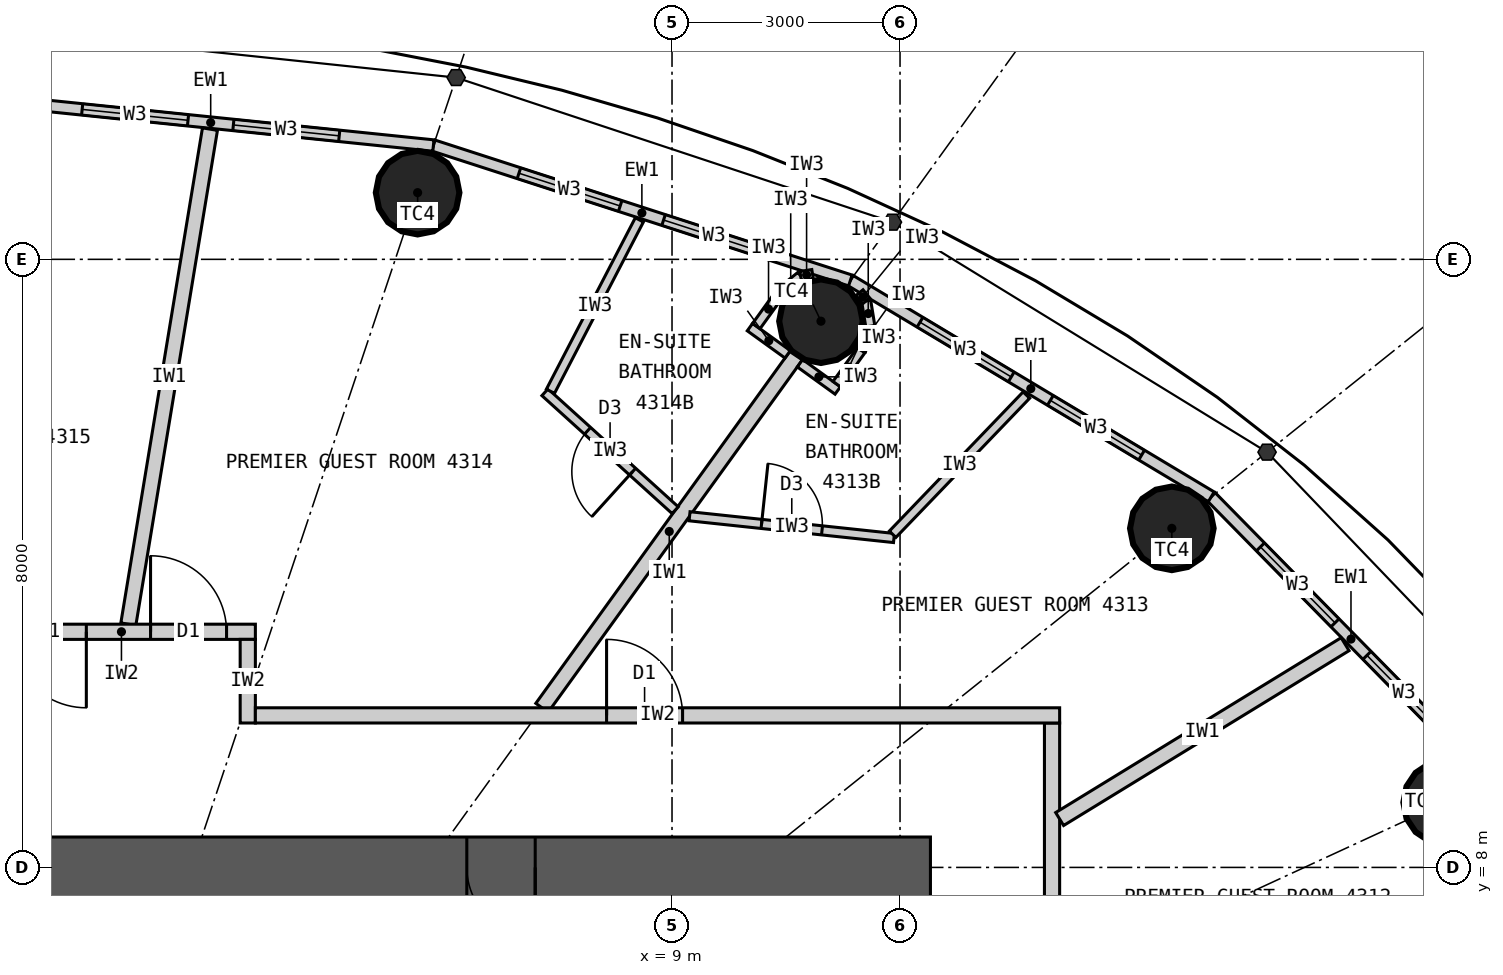
"""IFC4 building model, lengths in metres.
Left out: names, types, materials, properties, quantities, classifications, styles, units other than length and angle.
Written with IfcOpenShell. Run it as: python <this file> out.ifc"""

import sys

from ifc_helpers import new_model, si_unit, direction, frame, frame_2d, origin, origin_2d, place, context, subcontext, project, spatial, rectangle, circle, extrude, element, fill, save


model = new_model("IFC4")
c1 = context("Model", 3, precision=1e-05, world=origin(), true_north=direction((0.0, 1.0)))
c2 = subcontext(c1, "Body", "Model", "MODEL_VIEW")
j1 = project(units=[si_unit("LENGTHUNIT", "METRE"), si_unit("PLANEANGLEUNIT", "RADIAN")], contexts=[c1])
p1 = place(None, origin())
s1 = spatial("IfcSite", under=j1, at=p1, CompositionType="ELEMENT")
p2 = place(p1, origin())
s2 = spatial("IfcBuilding", under=s1, at=p2, CompositionType="ELEMENT")
p3 = place(p2, frame((0.0, 0.0, 163.2)))
s3 = spatial("IfcBuildingStorey", under=s2, at=p3, CompositionType="ELEMENT", Elevation=163.2)
for number, where, z_axis, x_axis in (
    (1, (19.172, 8.855, 0.0), (0.0, 0.0, 1.0), (1.0, 0.0, 0.0)),
    (2, (15.576, 12.461, 0.0), (0.0, 0.0, 1.0), (1.0, 0.0, 0.0)),
    (3, (10.96, 15.186, 0.0), (0.0, 0.0, 1.0), (1.0, 0.0, 0.0)),
    (4, (5.653, 16.877, 0.0), (0.0, 0.0, 1.0), (1.0, 0.0, 0.0)),
):
    element("IfcColumn", number, at=place(p3, frame(where, z_axis=z_axis, x_axis=x_axis)), inside=s3, PredefinedType="COLUMN", context=c2, shape_type="SweptSolid", body=[
        extrude(circle(Radius=0.55, at=origin_2d()), origin(), (0.0, 0.0, 1.0), 3.3),
    ])
p4 = place(p3, frame((-12.4, 8.0, 0.0), z_axis=(0.0, 0.0, 1.0), x_axis=(1.0, 0.0, 0.0)))
e5 = element("IfcWall", 5, at=p4, inside=s3, PredefinedType="SHEAR", context=c2, shape_type="SweptSolid", body=[
    extrude(rectangle(XDim=24.8, YDim=0.8, at=frame_2d((12.4, 0.0))), origin(), (0.0, 0.0, 1.0), 3.3),
])
p5 = place(p4, frame((11.1, 0.0, 0.0)))
e6 = element("IfcOpeningElement", 6, at=p5, cuts=e5, PredefinedType="OPENING", context=c2, shape_type="SweptSolid", body=[
    extrude(rectangle(XDim=1.2, YDim=2.2, at=frame_2d((0.6, 1.1))), frame((0.0, 0.41, 0.0), z_axis=(0.0, -1.0, 0.0), x_axis=(1.0, 0.0, 0.0)), (0.0, 0.0, 1.0), 0.82),
])
p6 = place(p4, frame((18.7, 0.0, 0.0)))
e7 = element("IfcOpeningElement", 7, at=p6, cuts=e5, PredefinedType="OPENING", context=c2, shape_type="SweptSolid", body=[
    extrude(rectangle(XDim=0.9, YDim=2.2, at=frame_2d((0.45, 1.1))), frame((0.0, 0.41, 0.0), z_axis=(0.0, -1.0, 0.0), x_axis=(1.0, 0.0, 0.0)), (0.0, 0.0, 1.0), 0.82),
])
p7 = place(p3, frame((19.772, 9.132, 0.0), z_axis=(0.0, 0.0, 1.0), x_axis=(-0.700727467776, 0.71342905457, 0.0)))
e8 = element("IfcWall", 8, at=p7, inside=s3, PredefinedType="ELEMENTEDWALL", context=c2, shape_type="SweptSolid", body=[
    extrude(rectangle(XDim=5.247, YDim=0.15, at=frame_2d((2.624, 0.0))), origin(), (0.0, 0.0, 1.0), 3.12),
])
p8 = place(p7, frame((0.924, 0.0, 0.9)))
e9 = element("IfcOpeningElement", 9, at=p8, cuts=e8, PredefinedType="OPENING", context=c2, shape_type="SweptSolid", body=[
    extrude(rectangle(XDim=1.4, YDim=1.9, at=frame_2d((0.7, 0.95))), frame((0.0, 0.085, 0.0), z_axis=(0.0, -1.0, 0.0), x_axis=(1.0, 0.0, 0.0)), (0.0, 0.0, 1.0), 0.17),
])
p9 = place(p7, frame((2.924, 0.0, 0.9)))
e10 = element("IfcOpeningElement", 10, at=p9, cuts=e8, PredefinedType="OPENING", context=c2, shape_type="SweptSolid", body=[
    extrude(rectangle(XDim=1.4, YDim=1.9, at=frame_2d((0.7, 0.95))), frame((0.0, 0.085, 0.0), z_axis=(0.0, -1.0, 0.0), x_axis=(1.0, 0.0, 0.0)), (0.0, 0.0, 1.0), 0.17),
])
p10 = place(p3, frame((16.095, 12.876, 0.0), z_axis=(0.0, 0.0, 1.0), x_axis=(-0.857695199231, 0.514158482587, 0.0)))
e11 = element("IfcWall", 11, at=p10, inside=s3, PredefinedType="ELEMENTEDWALL", context=c2, shape_type="SweptSolid", body=[
    extrude(rectangle(XDim=5.536, YDim=0.15, at=frame_2d((2.768, 0.0))), origin(), (0.0, 0.0, 1.0), 3.12),
])
p11 = place(p10, frame((1.068, 0.0, 0.9)))
e12 = element("IfcOpeningElement", 12, at=p11, cuts=e11, PredefinedType="OPENING", context=c2, shape_type="SweptSolid", body=[
    extrude(rectangle(XDim=1.4, YDim=1.9, at=frame_2d((0.7, 0.95))), frame((0.0, 0.085, 0.0), z_axis=(0.0, -1.0, 0.0), x_axis=(1.0, 0.0, 0.0)), (0.0, 0.0, 1.0), 0.17),
])
p12 = place(p10, frame((3.068, 0.0, 0.9)))
e13 = element("IfcOpeningElement", 13, at=p12, cuts=e11, PredefinedType="OPENING", context=c2, shape_type="SweptSolid", body=[
    extrude(rectangle(XDim=1.4, YDim=1.9, at=frame_2d((0.7, 0.95))), frame((0.0, 0.085, 0.0), z_axis=(0.0, -1.0, 0.0), x_axis=(1.0, 0.0, 0.0)), (0.0, 0.0, 1.0), 0.17),
])
p13 = place(p3, frame((11.346, 15.722, 0.0), z_axis=(0.0, 0.0, 1.0), x_axis=(-0.951432482129, 0.307857486429, 0.0)))
e14 = element("IfcWall", 14, at=p13, inside=s3, PredefinedType="ELEMENTEDWALL", context=c2, shape_type="SweptSolid", body=[
    extrude(rectangle(XDim=5.766, YDim=0.15, at=frame_2d((2.883, 0.0))), origin(), (0.0, 0.0, 1.0), 3.12),
])
p14 = place(p13, frame((1.183, 0.0, 0.9)))
e15 = element("IfcOpeningElement", 15, at=p14, cuts=e14, PredefinedType="OPENING", context=c2, shape_type="SweptSolid", body=[
    extrude(rectangle(XDim=1.4, YDim=1.9, at=frame_2d((0.7, 0.95))), frame((0.0, 0.085, 0.0), z_axis=(0.0, -1.0, 0.0), x_axis=(1.0, 0.0, 0.0)), (0.0, 0.0, 1.0), 0.17),
])
p15 = place(p13, frame((3.183, 0.0, 0.9)))
e16 = element("IfcOpeningElement", 16, at=p15, cuts=e14, PredefinedType="OPENING", context=c2, shape_type="SweptSolid", body=[
    extrude(rectangle(XDim=1.4, YDim=1.9, at=frame_2d((0.7, 0.95))), frame((0.0, 0.085, 0.0), z_axis=(0.0, -1.0, 0.0), x_axis=(1.0, 0.0, 0.0)), (0.0, 0.0, 1.0), 0.17),
])
p16 = place(p3, frame((5.86, 17.497, 0.0), z_axis=(0.0, 0.0, 1.0), x_axis=(-0.994751738032, 0.102318032045, 0.0)))
e17 = element("IfcWall", 17, at=p16, inside=s3, PredefinedType="ELEMENTEDWALL", context=c2, shape_type="SweptSolid", body=[
    extrude(rectangle(XDim=5.891, YDim=0.15, at=frame_2d((2.946, 0.0))), origin(), (0.0, 0.0, 1.0), 3.12),
])
p17 = place(p16, frame((1.246, 0.0, 0.9)))
e18 = element("IfcOpeningElement", 18, at=p17, cuts=e17, PredefinedType="OPENING", context=c2, shape_type="SweptSolid", body=[
    extrude(rectangle(XDim=1.4, YDim=1.9, at=frame_2d((0.7, 0.95))), frame((0.0, 0.085, 0.0), z_axis=(0.0, -1.0, 0.0), x_axis=(1.0, 0.0, 0.0)), (0.0, 0.0, 1.0), 0.17),
])
p18 = place(p16, frame((3.246, 0.0, 0.9)))
e19 = element("IfcOpeningElement", 19, at=p18, cuts=e17, PredefinedType="OPENING", context=c2, shape_type="SweptSolid", body=[
    extrude(rectangle(XDim=1.4, YDim=1.9, at=frame_2d((0.7, 0.95))), frame((0.0, 0.085, 0.0), z_axis=(0.0, -1.0, 0.0), x_axis=(1.0, 0.0, 0.0)), (0.0, 0.0, 1.0), 0.17),
])
p19 = place(p3, frame((14.0, -9.9, 0.0), z_axis=(0.0, 0.0, 1.0), x_axis=(0.0, 1.0, 0.0)))
e20 = element("IfcWall", 20, at=p19, inside=s3, PredefinedType="PARTITIONING", context=c2, shape_type="SweptSolid", body=[
    extrude(rectangle(XDim=19.8, YDim=0.2, at=frame_2d((9.9, 0.0))), origin(), (0.0, 0.0, 1.0), 3.12),
])
p20 = place(p19, frame((3.824, 0.0, 0.0)))
e21 = element("IfcOpeningElement", 21, at=p20, cuts=e20, PredefinedType="OPENING", context=c2, shape_type="SweptSolid", body=[
    extrude(rectangle(XDim=1.0, YDim=2.2, at=frame_2d((0.5, 1.1))), frame((0.0, 0.11, 0.0), z_axis=(0.0, -1.0, 0.0), x_axis=(1.0, 0.0, 0.0)), (0.0, 0.0, 1.0), 0.22),
])
p21 = place(p19, frame((8.719, 0.0, 0.0)))
e22 = element("IfcOpeningElement", 22, at=p21, cuts=e20, PredefinedType="OPENING", context=c2, shape_type="SweptSolid", body=[
    extrude(rectangle(XDim=1.0, YDim=2.2, at=frame_2d((0.5, 1.1))), frame((0.0, 0.11, 0.0), z_axis=(0.0, -1.0, 0.0), x_axis=(1.0, 0.0, 0.0)), (0.0, 0.0, 1.0), 0.22),
])
p22 = place(p19, frame((15.482, 0.0, 0.0)))
e23 = element("IfcOpeningElement", 23, at=p22, cuts=e20, PredefinedType="OPENING", context=c2, shape_type="SweptSolid", body=[
    extrude(rectangle(XDim=1.0, YDim=2.2, at=frame_2d((0.5, 1.1))), frame((0.0, 0.11, 0.0), z_axis=(0.0, -1.0, 0.0), x_axis=(1.0, 0.0, 0.0)), (0.0, 0.0, 1.0), 0.22),
])
p23 = place(p3, frame((14.1, 8.636, 0.0), z_axis=(0.0, 0.0, 1.0), x_axis=(0.852731884196, 0.522348862041, 0.0)))
e24 = element("IfcWall", 24, at=p23, inside=s3, PredefinedType="PARTITIONING", context=c2, shape_type="SweptSolid", body=[
    extrude(rectangle(XDim=4.404, YDim=0.2, at=frame_2d((2.202, 0.0))), origin(), (0.0, 0.0, 1.0), 3.12),
])
p24 = place(p3, frame((7.289, 10.1, 0.0), z_axis=(0.0, 0.0, 1.0), x_axis=(0.585222595178, 0.810872686735, 0.0)))
e25 = element("IfcWall", 25, at=p24, inside=s3, PredefinedType="PARTITIONING", context=c2, shape_type="SweptSolid", body=[
    extrude(rectangle(XDim=5.722, YDim=0.2, at=frame_2d((2.861, 0.0))), origin(), (0.0, 0.0, 1.0), 2.42),
])
p25 = place(p3, frame((1.847, 11.2, 0.0), z_axis=(0.0, 0.0, 1.0), x_axis=(0.162695449404, 0.986676335352, 0.0)))
e26 = element("IfcWall", 26, at=p25, inside=s3, PredefinedType="PARTITIONING", context=c2, shape_type="SweptSolid", body=[
    extrude(rectangle(XDim=6.601, YDim=0.2, at=frame_2d((3.301, 0.0))), origin(), (0.0, 0.0, 1.0), 3.12),
])
p26 = place(p3, frame((-0.006, 11.1, 0.0), z_axis=(0.0, 0.0, 1.0), x_axis=(1.0, 0.0, 0.0)))
e27 = element("IfcWall", 27, at=p26, inside=s3, PredefinedType="PARTITIONING", context=c2, shape_type="SweptSolid", body=[
    extrude(rectangle(XDim=3.524, YDim=0.2, at=frame_2d((1.762, 0.0))), origin(), (0.0, 0.0, 1.0), 3.12),
])
p27 = place(p26, frame((2.145, 0.0, 0.0)))
e28 = element("IfcOpeningElement", 28, at=p27, cuts=e27, PredefinedType="OPENING", context=c2, shape_type="SweptSolid", body=[
    extrude(rectangle(XDim=1.0, YDim=2.2, at=frame_2d((0.5, 1.1))), frame((0.0, 0.11, 0.0), z_axis=(0.0, -1.0, 0.0), x_axis=(1.0, 0.0, 0.0)), (0.0, 0.0, 1.0), 0.22),
])
p28 = place(p26, frame((0.3, 0.0, 0.0)))
e29 = element("IfcOpeningElement", 29, at=p28, cuts=e27, PredefinedType="OPENING", context=c2, shape_type="SweptSolid", body=[
    extrude(rectangle(XDim=1.0, YDim=2.2, at=frame_2d((0.5, 1.1))), frame((0.0, 0.11, 0.0), z_axis=(0.0, -1.0, 0.0), x_axis=(1.0, 0.0, 0.0)), (0.0, 0.0, 1.0), 0.22),
])
p29 = place(p3, frame((3.418, 9.9, 0.0), z_axis=(0.0, 0.0, 1.0), x_axis=(0.0, 1.0, 0.0)))
e30 = element("IfcWall", 30, at=p29, inside=s3, PredefinedType="PARTITIONING", context=c2, shape_type="SweptSolid", body=[
    extrude(rectangle(XDim=1.1, YDim=0.2, at=frame_2d((0.55, 0.0))), origin(), (0.0, 0.0, 1.0), 3.12),
])
p30 = place(p3, frame((9.231, 12.62, 0.0), z_axis=(0.0, 0.0, 1.0), x_axis=(0.99437860496, -0.10588290701, 0.0)))
e31 = element("IfcWall", 31, at=p30, inside=s3, PredefinedType="PARTITIONING", context=c2, shape_type="SweptSolid", body=[
    extrude(rectangle(XDim=2.705, YDim=0.12, at=frame_2d((1.352, 0.0))), origin(), (0.0, 0.0, 1.0), 3.12),
])
p31 = place(p30, frame((0.952, 0.0, 0.0)))
e32 = element("IfcOpeningElement", 32, at=p31, cuts=e31, PredefinedType="OPENING", context=c2, shape_type="SweptSolid", body=[
    extrude(rectangle(XDim=0.8, YDim=2.1, at=frame_2d((0.4, 1.05))), frame((0.0, 0.07, 0.0), z_axis=(0.0, -1.0, 0.0), x_axis=(1.0, 0.0, 0.0)), (0.0, 0.0, 1.0), 0.14),
])
p32 = place(p3, frame((11.902, 12.383, 0.0), z_axis=(0.0, 0.0, 1.0), x_axis=(0.69298385335, 0.720953104574, 0.0)))
e33 = element("IfcWall", 33, at=p32, inside=s3, PredefinedType="PARTITIONING", context=c2, shape_type="SweptSolid", body=[
    extrude(rectangle(XDim=2.54, YDim=0.12, at=frame_2d((1.27, 0.0))), origin(), (0.0, 0.0, 1.0), 3.12),
])
p33 = place(p3, frame((10.684, 14.633, 0.0), z_axis=(0.0, 0.0, 1.0), x_axis=(0.810921075692, -0.585155542568, 0.0)))
e34 = element("IfcWall", 34, at=p33, inside=s3, PredefinedType="PARTITIONING", context=c2, shape_type="SweptSolid", body=[
    extrude(rectangle(XDim=0.612, YDim=0.12, at=frame_2d((0.306, 0.0))), origin(), (0.0, 0.0, 1.0), 3.12),
])
p34 = place(p3, frame((11.167, 14.359, 0.0), z_axis=(0.0, 0.0, 1.0), x_axis=(0.585263549799, 0.810843127415, 0.0)))
e35 = element("IfcWall", 35, at=p34, inside=s3, PredefinedType="PARTITIONING", context=c2, shape_type="SweptSolid", body=[
    extrude(rectangle(XDim=0.55, YDim=0.12, at=frame_2d((0.275, 0.0))), origin(), (0.0, 0.0, 1.0), 3.12),
])
for number, where, z_axis, x_axis in (
    (36, (11.489, 14.804, 0.0), (0.0, 0.0, 1.0), (0.356, 0.935, 0.0)),
    (37, (11.609, 15.12, 0.0), (0.0, 0.0, 1.0), (-0.16, 0.987, 0.0)),
):
    element("IfcWall", number, at=place(p3, frame(where, z_axis=z_axis, x_axis=x_axis)), inside=s3, PredefinedType="PARTITIONING", context=c2, shape_type="SweptSolid", body=[
        extrude(rectangle(XDim=0.338, YDim=0.12, at=frame_2d((0.169, 0.0))), origin(), (0.0, 0.0, 1.0), 3.12),
    ])
p35 = place(p3, frame((11.555, 15.453, 0.0), z_axis=(0.0, 0.0, 1.0), x_axis=(-0.631711901025, 0.775203246964, 0.0)))
e38 = element("IfcWall", 38, at=p35, inside=s3, PredefinedType="PARTITIONING", context=c2, shape_type="SweptSolid", body=[
    extrude(rectangle(XDim=0.139, YDim=0.12, at=frame_2d((0.07, 0.0))), origin(), (0.0, 0.0, 1.0), 3.12),
])
p36 = place(p3, frame((9.042, 12.699, 0.0), z_axis=(0.0, 0.0, 1.0), x_axis=(-0.741100257539, 0.671394376112, 0.0)))
e39 = element("IfcWall", 39, at=p36, inside=s3, PredefinedType="PARTITIONING", context=c2, shape_type="SweptSolid", body=[
    extrude(rectangle(XDim=2.312, YDim=0.12, at=frame_2d((1.156, 0.0))), origin(), (0.0, 0.0, 1.0), 3.12),
])
p37 = place(p36, frame((0.756, 0.0, 0.0)))
e40 = element("IfcOpeningElement", 40, at=p37, cuts=e39, PredefinedType="OPENING", context=c2, shape_type="SweptSolid", body=[
    extrude(rectangle(XDim=0.8, YDim=2.1, at=frame_2d((0.4, 1.05))), frame((0.0, 0.07, 0.0), z_axis=(0.0, -1.0, 0.0), x_axis=(1.0, 0.0, 0.0)), (0.0, 0.0, 1.0), 0.14),
])
p38 = place(p3, frame((7.401, 14.264, 0.0), z_axis=(0.0, 0.0, 1.0), x_axis=(0.460505131319, 0.887657041897, 0.0)))
e41 = element("IfcWall", 41, at=p38, inside=s3, PredefinedType="PARTITIONING", context=c2, shape_type="SweptSolid", body=[
    extrude(rectangle(XDim=2.54, YDim=0.12, at=frame_2d((1.27, 0.0))), origin(), (0.0, 0.0, 1.0), 3.12),
])
p39 = place(p3, frame((10.522, 14.75, 0.0), z_axis=(0.0, 0.0, 1.0), x_axis=(-0.811057588427, 0.584966313777, 0.0)))
e42 = element("IfcWall", 42, at=p39, inside=s3, PredefinedType="PARTITIONING", context=c2, shape_type="SweptSolid", body=[
    extrude(rectangle(XDim=0.612, YDim=0.12, at=frame_2d((0.306, 0.0))), origin(), (0.0, 0.0, 1.0), 3.12),
])
p40 = place(p3, frame((10.109, 15.122, 0.0), z_axis=(0.0, 0.0, 1.0), x_axis=(0.585344718358, 0.810784534072, 0.0)))
e43 = element("IfcWall", 43, at=p40, inside=s3, PredefinedType="PARTITIONING", context=c2, shape_type="SweptSolid", body=[
    extrude(rectangle(XDim=0.55, YDim=0.12, at=frame_2d((0.275, 0.0))), origin(), (0.0, 0.0, 1.0), 3.12),
])
p41 = place(p3, frame((10.431, 15.568, 0.0), z_axis=(0.0, 0.0, 1.0), x_axis=(0.77505137267, 0.631898227345, 0.0)))
e44 = element("IfcWall", 44, at=p41, inside=s3, PredefinedType="PARTITIONING", context=c2, shape_type="SweptSolid", body=[
    extrude(rectangle(XDim=0.338, YDim=0.12, at=frame_2d((0.169, 0.0))), origin(), (0.0, 0.0, 1.0), 3.12),
])
p42 = place(p3, frame((10.693, 15.781, 0.0), z_axis=(0.0, 0.0, 1.0), x_axis=(0.987256785332, 0.159135287777, 0.0)))
e45 = element("IfcWall", 45, at=p42, inside=s3, PredefinedType="PARTITIONING", context=c2, shape_type="SweptSolid", body=[
    extrude(rectangle(XDim=0.158, YDim=0.12, at=frame_2d((0.079, 0.0))), origin(), (0.0, 0.0, 1.0), 3.12),
])
p43 = place(p3, frame((3.518, 10.0, 0.0), z_axis=(0.0, 0.0, 1.0), x_axis=(1.0, 0.0, 0.0)))
e46 = element("IfcWall", 46, at=p43, inside=s3, PredefinedType="PARTITIONING", context=c2, shape_type="SweptSolid", body=[
    extrude(rectangle(XDim=10.582, YDim=0.2, at=frame_2d((5.291, 0.0))), origin(), (0.0, 0.0, 1.0), 3.12),
])
p44 = place(p43, frame((4.621, 0.0, 0.0)))
e47 = element("IfcOpeningElement", 47, at=p44, cuts=e46, PredefinedType="OPENING", context=c2, shape_type="SweptSolid", body=[
    extrude(rectangle(XDim=1.0, YDim=2.2, at=frame_2d((0.5, 1.1))), frame((0.0, 0.11, 0.0), z_axis=(0.0, -1.0, 0.0), x_axis=(1.0, 0.0, 0.0)), (0.0, 0.0, 1.0), 0.22),
])
p45 = place(p8, origin())
e48 = element("IfcWindow", 48, at=p45, inside=s3, PartitioningType="SINGLE_PANEL", PredefinedType="WINDOW", context=c2, shape_type="SweptSolid", body=[
    extrude(rectangle(XDim=1.4, YDim=1.9, at=frame_2d((0.7, 0.95))), frame((0.0, 0.03, 0.0), z_axis=(0.0, -1.0, 0.0), x_axis=(1.0, 0.0, 0.0)), (0.0, 0.0, 1.0), 0.06),
])
fill(e9, e48)
p46 = place(p9, origin())
e49 = element("IfcWindow", 49, at=p46, inside=s3, PartitioningType="SINGLE_PANEL", PredefinedType="WINDOW", context=c2, shape_type="SweptSolid", body=[
    extrude(rectangle(XDim=1.4, YDim=1.9, at=frame_2d((0.7, 0.95))), frame((0.0, 0.03, 0.0), z_axis=(0.0, -1.0, 0.0), x_axis=(1.0, 0.0, 0.0)), (0.0, 0.0, 1.0), 0.06),
])
fill(e10, e49)
p47 = place(p11, origin())
e50 = element("IfcWindow", 50, at=p47, inside=s3, PartitioningType="SINGLE_PANEL", PredefinedType="WINDOW", context=c2, shape_type="SweptSolid", body=[
    extrude(rectangle(XDim=1.4, YDim=1.9, at=frame_2d((0.7, 0.95))), frame((0.0, 0.03, 0.0), z_axis=(0.0, -1.0, 0.0), x_axis=(1.0, 0.0, 0.0)), (0.0, 0.0, 1.0), 0.06),
])
fill(e12, e50)
p48 = place(p12, origin())
e51 = element("IfcWindow", 51, at=p48, inside=s3, PartitioningType="SINGLE_PANEL", PredefinedType="WINDOW", context=c2, shape_type="SweptSolid", body=[
    extrude(rectangle(XDim=1.4, YDim=1.9, at=frame_2d((0.7, 0.95))), frame((0.0, 0.03, 0.0), z_axis=(0.0, -1.0, 0.0), x_axis=(1.0, 0.0, 0.0)), (0.0, 0.0, 1.0), 0.06),
])
fill(e13, e51)
p49 = place(p14, origin())
e52 = element("IfcWindow", 52, at=p49, inside=s3, PartitioningType="SINGLE_PANEL", PredefinedType="WINDOW", context=c2, shape_type="SweptSolid", body=[
    extrude(rectangle(XDim=1.4, YDim=1.9, at=frame_2d((0.7, 0.95))), frame((0.0, 0.03, 0.0), z_axis=(0.0, -1.0, 0.0), x_axis=(1.0, 0.0, 0.0)), (0.0, 0.0, 1.0), 0.06),
])
fill(e15, e52)
p50 = place(p15, origin())
e53 = element("IfcWindow", 53, at=p50, inside=s3, PartitioningType="SINGLE_PANEL", PredefinedType="WINDOW", context=c2, shape_type="SweptSolid", body=[
    extrude(rectangle(XDim=1.4, YDim=1.9, at=frame_2d((0.7, 0.95))), frame((0.0, 0.03, 0.0), z_axis=(0.0, -1.0, 0.0), x_axis=(1.0, 0.0, 0.0)), (0.0, 0.0, 1.0), 0.06),
])
fill(e16, e53)
p51 = place(p17, origin())
e54 = element("IfcWindow", 54, at=p51, inside=s3, PartitioningType="SINGLE_PANEL", PredefinedType="WINDOW", context=c2, shape_type="SweptSolid", body=[
    extrude(rectangle(XDim=1.4, YDim=1.9, at=frame_2d((0.7, 0.95))), frame((0.0, 0.03, 0.0), z_axis=(0.0, -1.0, 0.0), x_axis=(1.0, 0.0, 0.0)), (0.0, 0.0, 1.0), 0.06),
])
fill(e18, e54)
p52 = place(p18, origin())
e55 = element("IfcWindow", 55, at=p52, inside=s3, PartitioningType="SINGLE_PANEL", PredefinedType="WINDOW", context=c2, shape_type="SweptSolid", body=[
    extrude(rectangle(XDim=1.4, YDim=1.9, at=frame_2d((0.7, 0.95))), frame((0.0, 0.03, 0.0), z_axis=(0.0, -1.0, 0.0), x_axis=(1.0, 0.0, 0.0)), (0.0, 0.0, 1.0), 0.06),
])
fill(e19, e55)
p53 = place(p31, origin())
e56 = element("IfcDoor", 56, at=p53, inside=s3, OperationType="SINGLE_SWING_LEFT", PredefinedType="DOOR", context=c2, shape_type="SweptSolid", body=[
    extrude(rectangle(XDim=0.8, YDim=2.1, at=frame_2d((0.4, 1.05))), frame((0.0, 0.025, 0.0), z_axis=(0.0, -1.0, 0.0), x_axis=(1.0, 0.0, 0.0)), (0.0, 0.0, 1.0), 0.05),
])
fill(e32, e56)
p54 = place(p44, origin())
e57 = element("IfcDoor", 57, at=p54, inside=s3, OperationType="SINGLE_SWING_LEFT", PredefinedType="DOOR", context=c2, shape_type="SweptSolid", body=[
    extrude(rectangle(XDim=1.0, YDim=2.2, at=frame_2d((0.5, 1.1))), frame((0.0, 0.025, 0.0), z_axis=(0.0, -1.0, 0.0), x_axis=(1.0, 0.0, 0.0)), (0.0, 0.0, 1.0), 0.05),
])
fill(e47, e57)
p55 = place(p37, origin())
e58 = element("IfcDoor", 58, at=p55, inside=s3, OperationType="SINGLE_SWING_LEFT", PredefinedType="DOOR", context=c2, shape_type="SweptSolid", body=[
    extrude(rectangle(XDim=0.8, YDim=2.1, at=frame_2d((0.4, 1.05))), frame((0.0, 0.025, 0.0), z_axis=(0.0, -1.0, 0.0), x_axis=(1.0, 0.0, 0.0)), (0.0, 0.0, 1.0), 0.05),
])
fill(e40, e58)
p56 = place(p27, origin())
e59 = element("IfcDoor", 59, at=p56, inside=s3, OperationType="SINGLE_SWING_LEFT", PredefinedType="DOOR", context=c2, shape_type="SweptSolid", body=[
    extrude(rectangle(XDim=1.0, YDim=2.2, at=frame_2d((0.5, 1.1))), frame((0.0, 0.025, 0.0), z_axis=(0.0, -1.0, 0.0), x_axis=(1.0, 0.0, 0.0)), (0.0, 0.0, 1.0), 0.05),
])
fill(e28, e59)
p57 = place(p28, origin())
e60 = element("IfcDoor", 60, at=p57, inside=s3, OperationType="SINGLE_SWING_RIGHT", PredefinedType="DOOR", context=c2, shape_type="SweptSolid", body=[
    extrude(rectangle(XDim=1.0, YDim=2.2, at=frame_2d((0.5, 1.1))), frame((0.0, 0.025, 0.0), z_axis=(0.0, -1.0, 0.0), x_axis=(1.0, 0.0, 0.0)), (0.0, 0.0, 1.0), 0.05),
])
fill(e29, e60)
p58 = place(p6, origin())
e61 = element("IfcDoor", 61, at=p58, inside=s3, OperationType="SINGLE_SWING_RIGHT", PredefinedType="DOOR", context=c2, shape_type="SweptSolid", body=[
    extrude(rectangle(XDim=0.9, YDim=2.2, at=frame_2d((0.45, 1.1))), frame((0.0, 0.025, 0.0), z_axis=(0.0, -1.0, 0.0), x_axis=(1.0, 0.0, 0.0)), (0.0, 0.0, 1.0), 0.05),
])
fill(e7, e61)
save(model, sys.argv[1])
